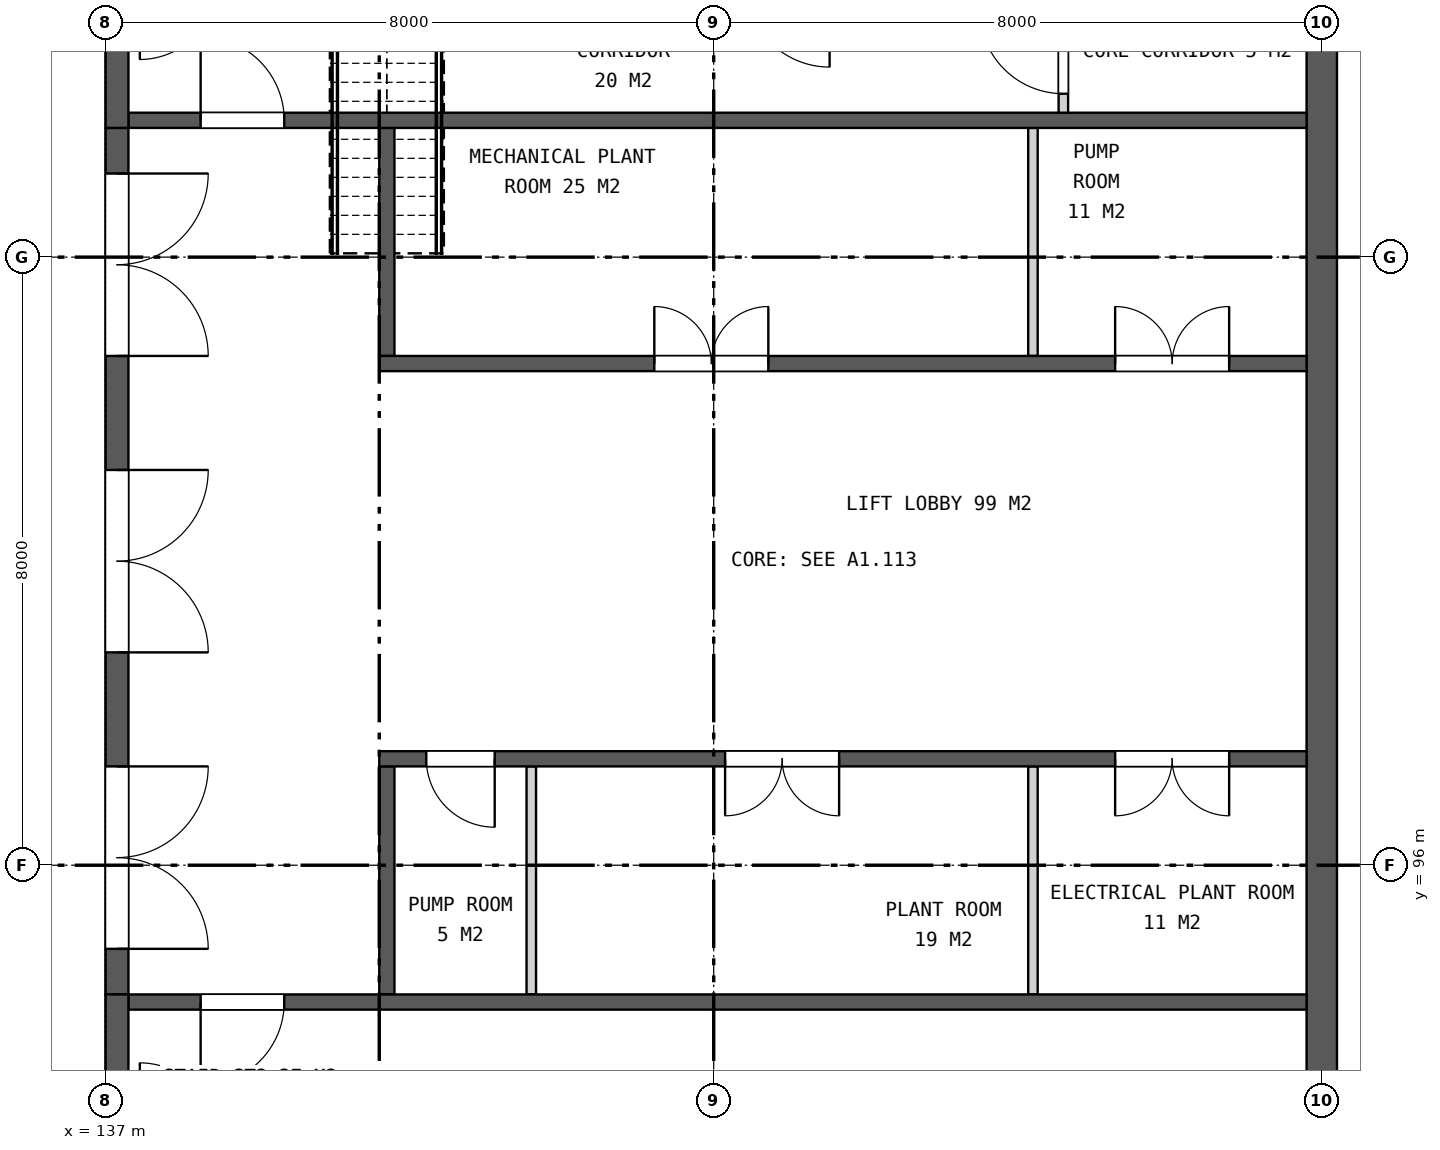
"""IFC4 building model, lengths in metres.
Left out: names, types, materials, properties, quantities, classifications, styles, units other than length and angle.
Written with IfcOpenShell. Run it as: python <this file> out.ifc"""

import sys

from ifc_helpers import new_model, si_unit, direction, frame, frame_2d, origin, place, context, subcontext, project, spatial, rectangle, extrude, element, fill, save


model = new_model("IFC4")
c1 = context("Model", 3, precision=1e-05, world=origin(), true_north=direction((0.0, 1.0)))
c2 = subcontext(c1, "Body", "Model", "MODEL_VIEW")
j1 = project(units=[si_unit("LENGTHUNIT", "METRE"), si_unit("PLANEANGLEUNIT", "RADIAN")], contexts=[c1])
p1 = place(None, origin())
s1 = spatial("IfcSite", under=j1, at=p1, CompositionType="ELEMENT")
p2 = place(p1, origin())
s2 = spatial("IfcBuilding", under=s1, at=p2, CompositionType="ELEMENT")
p3 = place(p2, frame((0.0, 0.0, 349.1)))
s3 = spatial("IfcBuildingStorey", under=s2, at=p3, CompositionType="ELEMENT", Elevation=349.1)
p4 = place(p3, frame((153.0, 88.2, 0.0), z_axis=(0.0, 0.0, 1.0), x_axis=(0.0, 1.0, 0.0)))
e1 = element("IfcWall", 1, at=p4, inside=s3, PredefinedType="SHEAR", context=c2, shape_type="SweptSolid", body=[
    extrude(rectangle(XDim=23.6, YDim=0.4, at=frame_2d((11.8, 0.0))), origin(), (0.0, 0.0, 1.0), 12.0),
])
p5 = place(p3, frame((137.15, 94.3, 0.0), z_axis=(0.0, 0.0, 1.0), x_axis=(0.0, 1.0, 0.0)))
e2 = element("IfcWall", 2, at=p5, inside=s3, PredefinedType="SHEAR", context=c2, shape_type="SweptSolid", body=[
    extrude(rectangle(XDim=11.4, YDim=0.3, at=frame_2d((5.7, 0.0))), origin(), (0.0, 0.0, 1.0), 12.0),
])
p6 = place(p5, frame((0.6, 0.0, 0.0)))
e3 = element("IfcOpeningElement", 3, at=p6, cuts=e2, PredefinedType="OPENING", context=c2, shape_type="SweptSolid", body=[
    extrude(rectangle(XDim=2.4, YDim=2.4, at=frame_2d((1.2, 1.2))), frame((0.0, 0.16, 0.0), z_axis=(0.0, -1.0, 0.0), x_axis=(1.0, 0.0, 0.0)), (0.0, 0.0, 1.0), 0.32),
])
p7 = place(p5, frame((4.5, 0.0, 0.0)))
e4 = element("IfcOpeningElement", 4, at=p7, cuts=e2, PredefinedType="OPENING", context=c2, shape_type="SweptSolid", body=[
    extrude(rectangle(XDim=2.4, YDim=2.4, at=frame_2d((1.2, 1.2))), frame((0.0, 0.16, 0.0), z_axis=(0.0, -1.0, 0.0), x_axis=(1.0, 0.0, 0.0)), (0.0, 0.0, 1.0), 0.32),
])
p8 = place(p5, frame((8.4, 0.0, 0.0)))
e5 = element("IfcOpeningElement", 5, at=p8, cuts=e2, PredefinedType="OPENING", context=c2, shape_type="SweptSolid", body=[
    extrude(rectangle(XDim=2.4, YDim=2.4, at=frame_2d((1.2, 1.2))), frame((0.0, 0.16, 0.0), z_axis=(0.0, -1.0, 0.0), x_axis=(1.0, 0.0, 0.0)), (0.0, 0.0, 1.0), 0.32),
])
p9 = place(p3, frame((140.7, 102.7, 0.0), z_axis=(0.0, 0.0, 1.0), x_axis=(0.0, 1.0, 0.0)))
e6 = element("IfcWall", 6, at=p9, inside=s3, PredefinedType="SHEAR", context=c2, shape_type="SweptSolid", body=[
    extrude(rectangle(XDim=3.0, YDim=0.2, at=frame_2d((1.5, 0.0))), origin(), (0.0, 0.0, 1.0), 9.2),
])
p10 = place(p3, frame((149.2, 102.7, 0.0), z_axis=(0.0, 0.0, 1.0), x_axis=(0.0, 1.0, 0.0)))
e7 = element("IfcWall", 7, at=p10, inside=s3, PredefinedType="PARTITIONING", context=c2, shape_type="SweptSolid", body=[
    extrude(rectangle(XDim=3.0, YDim=0.125, at=frame_2d((1.5, 0.0))), origin(), (0.0, 0.0, 1.0), 9.2),
])
p11 = place(p3, frame((140.6, 102.6, 0.0), z_axis=(0.0, 0.0, 1.0), x_axis=(1.0, 0.0, 0.0)))
e8 = element("IfcWall", 8, at=p11, inside=s3, PredefinedType="SHEAR", context=c2, shape_type="SweptSolid", body=[
    extrude(rectangle(XDim=12.2, YDim=0.2, at=frame_2d((6.1, 0.0))), origin(), (0.0, 0.0, 1.0), 9.2),
])
p12 = place(p11, frame((3.619, 0.0, 0.0)))
e9 = element("IfcOpeningElement", 9, at=p12, cuts=e8, PredefinedType="OPENING", context=c2, shape_type="SweptSolid", body=[
    extrude(rectangle(XDim=1.5, YDim=2.1, at=frame_2d((0.75, 1.05))), frame((0.0, 0.11, 0.0), z_axis=(0.0, -1.0, 0.0), x_axis=(1.0, 0.0, 0.0)), (0.0, 0.0, 1.0), 0.22),
])
p13 = place(p11, frame((9.681, 0.0, 0.0)))
e10 = element("IfcOpeningElement", 10, at=p13, cuts=e8, PredefinedType="OPENING", context=c2, shape_type="SweptSolid", body=[
    extrude(rectangle(XDim=1.5, YDim=2.1, at=frame_2d((0.75, 1.05))), frame((0.0, 0.11, 0.0), z_axis=(0.0, -1.0, 0.0), x_axis=(1.0, 0.0, 0.0)), (0.0, 0.0, 1.0), 0.22),
])
p14 = place(p3, frame((140.7, 94.3, 0.0), z_axis=(0.0, 0.0, 1.0), x_axis=(0.0, 1.0, 0.0)))
e11 = element("IfcWall", 11, at=p14, inside=s3, PredefinedType="SHEAR", context=c2, shape_type="SweptSolid", body=[
    extrude(rectangle(XDim=3.0, YDim=0.2, at=frame_2d((1.5, 0.0))), origin(), (0.0, 0.0, 1.0), 9.2),
])
for number, where, z_axis, x_axis in (
    (12, (142.6, 94.3, 0.0), (0.0, 0.0, 1.0), (0.0, 1.0, 0.0)),
    (13, (149.2, 94.3, 0.0), (0.0, 0.0, 1.0), (0.0, 1.0, 0.0)),
):
    element("IfcWall", number, at=place(p3, frame(where, z_axis=z_axis, x_axis=x_axis)), inside=s3, PredefinedType="PARTITIONING", context=c2, shape_type="SweptSolid", body=[
        extrude(rectangle(XDim=3.0, YDim=0.125, at=frame_2d((1.5, 0.0))), origin(), (0.0, 0.0, 1.0), 9.2),
    ])
p15 = place(p3, frame((140.6, 97.4, 0.0), z_axis=(0.0, 0.0, 1.0), x_axis=(1.0, 0.0, 0.0)))
e14 = element("IfcWall", 14, at=p15, inside=s3, PredefinedType="SHEAR", context=c2, shape_type="SweptSolid", body=[
    extrude(rectangle(XDim=12.2, YDim=0.2, at=frame_2d((6.1, 0.0))), origin(), (0.0, 0.0, 1.0), 9.2),
])
p16 = place(p15, frame((0.619, 0.0, 0.0)))
e15 = element("IfcOpeningElement", 15, at=p16, cuts=e14, PredefinedType="OPENING", context=c2, shape_type="SweptSolid", body=[
    extrude(rectangle(XDim=0.9, YDim=2.1, at=frame_2d((0.45, 1.05))), frame((0.0, 0.11, 0.0), z_axis=(0.0, -1.0, 0.0), x_axis=(1.0, 0.0, 0.0)), (0.0, 0.0, 1.0), 0.22),
])
p17 = place(p15, frame((4.55, 0.0, 0.0)))
e16 = element("IfcOpeningElement", 16, at=p17, cuts=e14, PredefinedType="OPENING", context=c2, shape_type="SweptSolid", body=[
    extrude(rectangle(XDim=1.5, YDim=2.1, at=frame_2d((0.75, 1.05))), frame((0.0, 0.11, 0.0), z_axis=(0.0, -1.0, 0.0), x_axis=(1.0, 0.0, 0.0)), (0.0, 0.0, 1.0), 0.22),
])
p18 = place(p15, frame((9.681, 0.0, 0.0)))
e17 = element("IfcOpeningElement", 17, at=p18, cuts=e14, PredefinedType="OPENING", context=c2, shape_type="SweptSolid", body=[
    extrude(rectangle(XDim=1.5, YDim=2.1, at=frame_2d((0.75, 1.05))), frame((0.0, 0.11, 0.0), z_axis=(0.0, -1.0, 0.0), x_axis=(1.0, 0.0, 0.0)), (0.0, 0.0, 1.0), 0.22),
])
p19 = place(p3, frame((137.3, 105.8, 0.0), z_axis=(0.0, 0.0, 1.0), x_axis=(1.0, 0.0, 0.0)))
e18 = element("IfcWall", 18, at=p19, inside=s3, PredefinedType="SHEAR", context=c2, shape_type="SweptSolid", body=[
    extrude(rectangle(XDim=15.5, YDim=0.2, at=frame_2d((7.75, 0.0))), origin(), (0.0, 0.0, 1.0), 9.2),
])
p20 = place(p19, frame((0.95, 0.0, 0.0)))
e19 = element("IfcOpeningElement", 19, at=p20, cuts=e18, PredefinedType="OPENING", context=c2, shape_type="SweptSolid", body=[
    extrude(rectangle(XDim=1.1, YDim=2.1, at=frame_2d((0.55, 1.05))), frame((0.0, 0.11, 0.0), z_axis=(0.0, -1.0, 0.0), x_axis=(1.0, 0.0, 0.0)), (0.0, 0.0, 1.0), 0.22),
])
p21 = place(p3, frame((137.15, 105.7, 0.0), z_axis=(0.0, 0.0, 1.0), x_axis=(0.0, 1.0, 0.0)))
e20 = element("IfcWall", 20, at=p21, inside=s3, PredefinedType="SHEAR", context=c2, shape_type="SweptSolid", body=[
    extrude(rectangle(XDim=6.05, YDim=0.3, at=frame_2d((3.025, 0.0))), origin(), (0.0, 0.0, 1.0), 12.0),
])
p22 = place(p3, frame((149.6, 105.9, 0.0), z_axis=(0.0, 0.0, 1.0), x_axis=(0.0, 1.0, 0.0)))
e21 = element("IfcWall", 21, at=p22, inside=s3, PredefinedType="PARTITIONING", context=c2, shape_type="SweptSolid", body=[
    extrude(rectangle(XDim=1.6, YDim=0.125, at=frame_2d((0.8, 0.0))), origin(), (0.0, 0.0, 1.0), 9.2),
])
p23 = place(p22, frame((0.25, 0.0, 0.0)))
e22 = element("IfcOpeningElement", 22, at=p23, cuts=e21, PredefinedType="OPENING", context=c2, shape_type="SweptSolid", body=[
    extrude(rectangle(XDim=1.1, YDim=2.1, at=frame_2d((0.55, 1.05))), frame((0.0, 0.073, 0.0), z_axis=(0.0, -1.0, 0.0), x_axis=(1.0, 0.0, 0.0)), (0.0, 0.0, 1.0), 0.145),
])
p24 = place(p3, frame((137.3, 94.2, 0.0), z_axis=(0.0, 0.0, 1.0), x_axis=(1.0, 0.0, 0.0)))
e23 = element("IfcWall", 23, at=p24, inside=s3, PredefinedType="SHEAR", context=c2, shape_type="SweptSolid", body=[
    extrude(rectangle(XDim=15.5, YDim=0.2, at=frame_2d((7.75, 0.0))), origin(), (0.0, 0.0, 1.0), 9.2),
])
p25 = place(p24, frame((0.95, 0.0, 0.0)))
e24 = element("IfcOpeningElement", 24, at=p25, cuts=e23, PredefinedType="OPENING", context=c2, shape_type="SweptSolid", body=[
    extrude(rectangle(XDim=1.1, YDim=2.1, at=frame_2d((0.55, 1.05))), frame((0.0, 0.11, 0.0), z_axis=(0.0, -1.0, 0.0), x_axis=(1.0, 0.0, 0.0)), (0.0, 0.0, 1.0), 0.22),
])
p26 = place(p3, frame((137.15, 88.25, 0.0), z_axis=(0.0, 0.0, 1.0), x_axis=(0.0, 1.0, 0.0)))
e25 = element("IfcWall", 25, at=p26, inside=s3, PredefinedType="SHEAR", context=c2, shape_type="SweptSolid", body=[
    extrude(rectangle(XDim=6.05, YDim=0.3, at=frame_2d((3.025, 0.0))), origin(), (0.0, 0.0, 1.0), 12.0),
])
p27 = place(p6, frame((2.4, 0.0, 0.0), z_axis=(0.0, 0.0, 1.0), x_axis=(-1.0, 0.0, 0.0)))
e26 = element("IfcDoor", 26, at=p27, inside=s3, OperationType="DOUBLE_DOOR_SINGLE_SWING", PredefinedType="DOOR", context=c2, shape_type="SweptSolid", body=[
    extrude(rectangle(XDim=2.4, YDim=2.4, at=frame_2d((1.2, 1.2))), frame((0.0, 0.025, 0.0), z_axis=(0.0, -1.0, 0.0), x_axis=(1.0, 0.0, 0.0)), (0.0, 0.0, 1.0), 0.05),
])
fill(e3, e26)
p28 = place(p7, frame((2.4, 0.0, 0.0), z_axis=(0.0, 0.0, 1.0), x_axis=(-1.0, 0.0, 0.0)))
e27 = element("IfcDoor", 27, at=p28, inside=s3, OperationType="DOUBLE_DOOR_SINGLE_SWING", PredefinedType="DOOR", context=c2, shape_type="SweptSolid", body=[
    extrude(rectangle(XDim=2.4, YDim=2.4, at=frame_2d((1.2, 1.2))), frame((0.0, 0.025, 0.0), z_axis=(0.0, -1.0, 0.0), x_axis=(1.0, 0.0, 0.0)), (0.0, 0.0, 1.0), 0.05),
])
fill(e4, e27)
p29 = place(p8, frame((2.4, 0.0, 0.0), z_axis=(0.0, 0.0, 1.0), x_axis=(-1.0, 0.0, 0.0)))
e28 = element("IfcDoor", 28, at=p29, inside=s3, OperationType="DOUBLE_DOOR_SINGLE_SWING", PredefinedType="DOOR", context=c2, shape_type="SweptSolid", body=[
    extrude(rectangle(XDim=2.4, YDim=2.4, at=frame_2d((1.2, 1.2))), frame((0.0, 0.025, 0.0), z_axis=(0.0, -1.0, 0.0), x_axis=(1.0, 0.0, 0.0)), (0.0, 0.0, 1.0), 0.05),
])
fill(e5, e28)
p30 = place(p12, origin())
e29 = element("IfcDoor", 29, at=p30, inside=s3, OperationType="DOUBLE_DOOR_SINGLE_SWING", PredefinedType="DOOR", context=c2, shape_type="SweptSolid", body=[
    extrude(rectangle(XDim=1.5, YDim=2.1, at=frame_2d((0.75, 1.05))), frame((0.0, 0.025, 0.0), z_axis=(0.0, -1.0, 0.0), x_axis=(1.0, 0.0, 0.0)), (0.0, 0.0, 1.0), 0.05),
])
fill(e9, e29)
p31 = place(p13, origin())
e30 = element("IfcDoor", 30, at=p31, inside=s3, OperationType="DOUBLE_DOOR_SINGLE_SWING", PredefinedType="DOOR", context=c2, shape_type="SweptSolid", body=[
    extrude(rectangle(XDim=1.5, YDim=2.1, at=frame_2d((0.75, 1.05))), frame((0.0, 0.025, 0.0), z_axis=(0.0, -1.0, 0.0), x_axis=(1.0, 0.0, 0.0)), (0.0, 0.0, 1.0), 0.05),
])
fill(e10, e30)
p32 = place(p16, frame((0.9, 0.0, 0.0), z_axis=(0.0, 0.0, 1.0), x_axis=(-1.0, 0.0, 0.0)))
e31 = element("IfcDoor", 31, at=p32, inside=s3, OperationType="SINGLE_SWING_LEFT", PredefinedType="DOOR", context=c2, shape_type="SweptSolid", body=[
    extrude(rectangle(XDim=0.9, YDim=2.1, at=frame_2d((0.45, 1.05))), frame((0.0, 0.025, 0.0), z_axis=(0.0, -1.0, 0.0), x_axis=(1.0, 0.0, 0.0)), (0.0, 0.0, 1.0), 0.05),
])
fill(e15, e31)
p33 = place(p17, frame((1.5, 0.0, 0.0), z_axis=(0.0, 0.0, 1.0), x_axis=(-1.0, 0.0, 0.0)))
e32 = element("IfcDoor", 32, at=p33, inside=s3, OperationType="DOUBLE_DOOR_SINGLE_SWING", PredefinedType="DOOR", context=c2, shape_type="SweptSolid", body=[
    extrude(rectangle(XDim=1.5, YDim=2.1, at=frame_2d((0.75, 1.05))), frame((0.0, 0.025, 0.0), z_axis=(0.0, -1.0, 0.0), x_axis=(1.0, 0.0, 0.0)), (0.0, 0.0, 1.0), 0.05),
])
fill(e16, e32)
p34 = place(p18, frame((1.5, 0.0, 0.0), z_axis=(0.0, 0.0, 1.0), x_axis=(-1.0, 0.0, 0.0)))
e33 = element("IfcDoor", 33, at=p34, inside=s3, OperationType="DOUBLE_DOOR_SINGLE_SWING", PredefinedType="DOOR", context=c2, shape_type="SweptSolid", body=[
    extrude(rectangle(XDim=1.5, YDim=2.1, at=frame_2d((0.75, 1.05))), frame((0.0, 0.025, 0.0), z_axis=(0.0, -1.0, 0.0), x_axis=(1.0, 0.0, 0.0)), (0.0, 0.0, 1.0), 0.05),
])
fill(e17, e33)
p35 = place(p20, origin())
e34 = element("IfcDoor", 34, at=p35, inside=s3, OperationType="SINGLE_SWING_LEFT", PredefinedType="DOOR", context=c2, shape_type="SweptSolid", body=[
    extrude(rectangle(XDim=1.1, YDim=2.1, at=frame_2d((0.55, 1.05))), frame((0.0, 0.025, 0.0), z_axis=(0.0, -1.0, 0.0), x_axis=(1.0, 0.0, 0.0)), (0.0, 0.0, 1.0), 0.05),
])
fill(e19, e34)
p36 = place(p23, origin())
e35 = element("IfcDoor", 35, at=p36, inside=s3, OperationType="SINGLE_SWING_RIGHT", PredefinedType="DOOR", context=c2, shape_type="SweptSolid", body=[
    extrude(rectangle(XDim=1.1, YDim=2.1, at=frame_2d((0.55, 1.05))), frame((0.0, 0.025, 0.0), z_axis=(0.0, -1.0, 0.0), x_axis=(1.0, 0.0, 0.0)), (0.0, 0.0, 1.0), 0.05),
])
fill(e22, e35)
p37 = place(p25, frame((1.1, 0.0, 0.0), z_axis=(0.0, 0.0, 1.0), x_axis=(-1.0, 0.0, 0.0)))
e36 = element("IfcDoor", 36, at=p37, inside=s3, OperationType="SINGLE_SWING_RIGHT", PredefinedType="DOOR", context=c2, shape_type="SweptSolid", body=[
    extrude(rectangle(XDim=1.1, YDim=2.1, at=frame_2d((0.55, 1.05))), frame((0.0, 0.025, 0.0), z_axis=(0.0, -1.0, 0.0), x_axis=(1.0, 0.0, 0.0)), (0.0, 0.0, 1.0), 0.05),
])
fill(e24, e36)
save(model, sys.argv[1])
